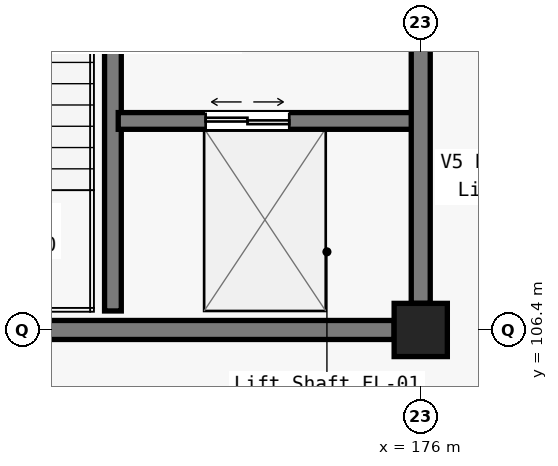
"""IFC4 building model, lengths in metres.
Left out: names, types, materials, properties, quantities, classifications, styles, units other than length and angle.
Written with IfcOpenShell. Run it as: python <this file> out.ifc"""

import sys

from ifc_helpers import new_model, si_unit, direction, frame, frame_2d, origin, origin_2d, place, context, subcontext, project, spatial, rectangle, extrude, element, fill, save


model = new_model("IFC4")
c1 = context("Model", 3, precision=1e-05, world=origin(), true_north=direction((0.0, 1.0)))
c2 = subcontext(c1, "Body", "Model", "MODEL_VIEW")
j1 = project(units=[si_unit("LENGTHUNIT", "METRE"), si_unit("PLANEANGLEUNIT", "RADIAN")], contexts=[c1])
p1 = place(None, origin())
s1 = spatial("IfcSite", under=j1, at=p1, CompositionType="ELEMENT")
p2 = place(p1, origin())
s2 = spatial("IfcBuilding", under=s1, at=p2, CompositionType="ELEMENT")
p3 = place(p2, frame((0.0, 0.0, -5.4)))
s3 = spatial("IfcBuildingStorey", under=s2, at=p3, CompositionType="ELEMENT", Elevation=-5.4)
p4 = place(p3, frame((176.0, 106.4, 0.0), z_axis=(0.0, 0.0, 1.0), x_axis=(1.0, 0.0, 0.0)))
e1 = element("IfcColumn", 1, at=p4, inside=s3, PredefinedType="COLUMN", context=c2, shape_type="SweptSolid", body=[
    extrude(rectangle(XDim=0.7, YDim=0.7, at=origin_2d()), origin(), (0.0, 0.0, 1.0), 5.4),
])
p5 = place(p3, frame((168.4, 106.4, 0.0), z_axis=(0.0, 0.0, 1.0), x_axis=(1.0, 0.0, 0.0)))
e2 = element("IfcWall", 2, at=p5, inside=s3, PredefinedType="SOLIDWALL", context=c2, shape_type="SweptSolid", body=[
    extrude(rectangle(XDim=7.25, YDim=0.25, at=frame_2d((3.625, 0.0))), origin(), (0.0, 0.0, 1.0), 4.205),
])
p6 = place(p3, frame((171.95, 106.65, 0.0), z_axis=(0.0, 0.0, 1.0), x_axis=(0.0, 1.0, 0.0)))
e3 = element("IfcWall", 3, at=p6, inside=s3, PredefinedType="SOLIDWALL", context=c2, shape_type="SweptSolid", body=[
    extrude(rectangle(XDim=7.1, YDim=0.22, at=frame_2d((3.55, 0.0))), origin(), (0.0, 0.0, 1.0), 5.08),
])
p7 = place(p6, frame((5.55, 0.0, 0.0)))
e4 = element("IfcOpeningElement", 4, at=p7, cuts=e3, PredefinedType="OPENING", context=c2, shape_type="SweptSolid", body=[
    extrude(rectangle(XDim=1.2, YDim=2.15, at=frame_2d((0.6, 1.075))), frame((0.0, 0.12, 0.0), z_axis=(0.0, -1.0, 0.0), x_axis=(1.0, 0.0, 0.0)), (0.0, 0.0, 1.0), 0.24),
])
p8 = place(p3, frame((172.02, 109.15, 0.0), z_axis=(0.0, 0.0, 1.0), x_axis=(1.0, 0.0, 0.0)))
e5 = element("IfcWall", 5, at=p8, inside=s3, PredefinedType="SOLIDWALL", context=c2, shape_type="SweptSolid", body=[
    extrude(rectangle(XDim=3.93, YDim=0.22, at=frame_2d((1.965, 0.0))), origin(), (0.0, 0.0, 1.0), 4.455),
])
p9 = place(p8, frame((1.15, 0.0, 0.0)))
e6 = element("IfcOpeningElement", 6, at=p9, cuts=e5, PredefinedType="OPENING", context=c2, shape_type="SweptSolid", body=[
    extrude(rectangle(XDim=1.1, YDim=2.2, at=frame_2d((0.55, 1.1))), frame((0.0, 0.12, 0.0), z_axis=(0.0, -1.0, 0.0), x_axis=(1.0, 0.0, 0.0)), (0.0, 0.0, 1.0), 0.24),
])
p10 = place(p3, frame((176.0, 106.75, 0.0), z_axis=(0.0, 0.0, 1.0), x_axis=(0.0, 1.0, 0.0)))
e7 = element("IfcWall", 7, at=p10, inside=s3, PredefinedType="SOLIDWALL", context=c2, shape_type="SweptSolid", body=[
    extrude(rectangle(XDim=6.8, YDim=0.25, at=frame_2d((3.4, 0.0))), origin(), (0.0, 0.0, 1.0), 4.205),
])
p11 = place(p10, frame((3.5, 0.0, 0.0)))
e8 = element("IfcOpeningElement", 8, at=p11, cuts=e7, PredefinedType="OPENING", context=c2, shape_type="SweptSolid", body=[
    extrude(rectangle(XDim=1.35, YDim=2.2, at=frame_2d((0.675, 1.1))), frame((0.0, 0.135, 0.0), z_axis=(0.0, -1.0, 0.0), x_axis=(1.0, 0.0, 0.0)), (0.0, 0.0, 1.0), 0.27),
])
p12 = place(p9, origin())
e9 = element("IfcDoor", 9, at=p12, inside=s3, OperationType="DOUBLE_DOOR_SLIDING", PredefinedType="DOOR", context=c2, shape_type="SweptSolid", body=[
    extrude(rectangle(XDim=1.1, YDim=2.2, at=frame_2d((0.55, 1.1))), frame((0.0, 0.025, 0.0), z_axis=(0.0, -1.0, 0.0), x_axis=(1.0, 0.0, 0.0)), (0.0, 0.0, 1.0), 0.05),
])
fill(e6, e9)
save(model, sys.argv[1])
